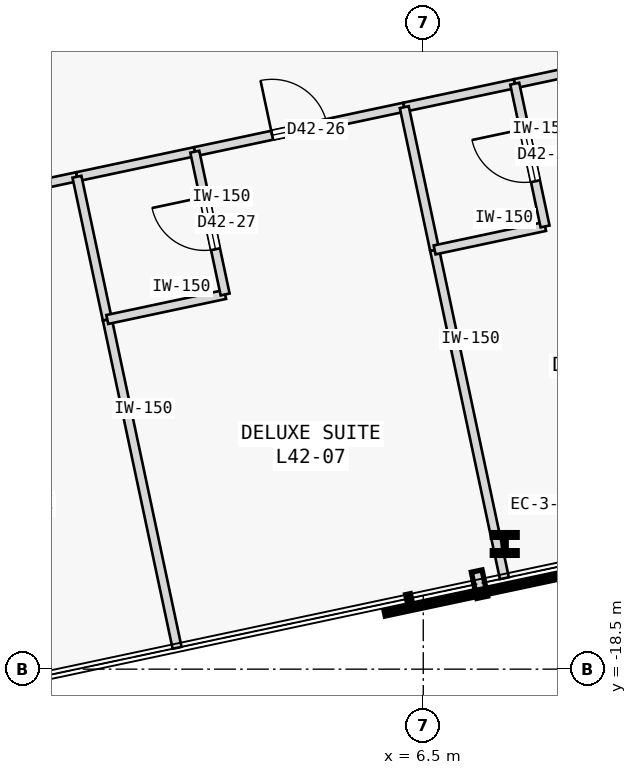
"""IFC4 building model, lengths in metres.
Left out: names, types, materials, properties, quantities, classifications, styles, units other than length and angle.
Written with IfcOpenShell. Run it as: python <this file> out.ifc"""

import sys

from ifc_helpers import new_model, si_unit, direction, frame, frame_2d, origin, origin_2d, place, context, subcontext, project, spatial, rectangle, i_section, extrude, element, fill, save


model = new_model("IFC4")
c1 = context("Model", 3, precision=1e-05, world=origin(), true_north=direction((0.0, 1.0)))
c2 = subcontext(c1, "Body", "Model", "MODEL_VIEW")
j1 = project(units=[si_unit("LENGTHUNIT", "METRE"), si_unit("PLANEANGLEUNIT", "RADIAN")], contexts=[c1])
p1 = place(None, origin())
s1 = spatial("IfcSite", under=j1, at=p1, CompositionType="ELEMENT")
p2 = place(p1, origin())
s2 = spatial("IfcBuilding", under=s1, at=p2, CompositionType="ELEMENT")
p3 = place(p2, frame((0.0, 0.0, 165.0)))
s3 = spatial("IfcBuildingStorey", under=s2, at=p3, CompositionType="ELEMENT", Elevation=165.0)
p4 = place(p3, frame((7.84, -16.441, 0.0), z_axis=(0.0, 0.0, 1.0), x_axis=(1.0, 0.0, 0.0)))
e1 = element("IfcColumn", 1, at=p4, inside=s3, PredefinedType="COLUMN", context=c2, shape_type="SweptSolid", body=[
    extrude(i_section(OverallWidth=0.409, OverallDepth=0.374, WebThickness=0.048, FlangeThickness=0.077, FilletRadius=0.015, at=origin_2d()), origin(), (0.0, 0.0, 1.0), 3.4),
])
p5 = place(p3, frame((-2.641, -11.135, 0.0), z_axis=(0.0, 0.0, 1.0), x_axis=(0.978150924733, 0.207896052016, 0.0)))
e2 = element("IfcWall", 2, at=p5, inside=s3, PredefinedType="PARTITIONING", context=c2, shape_type="SweptSolid", body=[
    extrude(rectangle(XDim=3.523, YDim=0.15, at=frame_2d((1.761, 0.0))), origin(), (0.0, 0.0, 1.0), 3.175),
])
p6 = place(p5, frame((1.302, 0.0, 0.0)))
e3 = element("IfcOpeningElement", 3, at=p6, cuts=e2, PredefinedType="OPENING", context=c2, shape_type="SweptSolid", body=[
    extrude(rectangle(XDim=0.92, YDim=2.15, at=frame_2d((0.46, 1.075))), frame((0.0, 0.085, 0.0), z_axis=(0.0, -1.0, 0.0), x_axis=(1.0, 0.0, 0.0)), (0.0, 0.0, 1.0), 0.17),
])
p7 = place(p3, frame((2.743, -9.99, 0.0), z_axis=(0.0, 0.0, 1.0), x_axis=(0.978153036861, 0.207886114205, 0.0)))
e4 = element("IfcWall", 4, at=p7, inside=s3, PredefinedType="PARTITIONING", context=c2, shape_type="SweptSolid", body=[
    extrude(rectangle(XDim=3.522, YDim=0.15, at=frame_2d((1.761, 0.0))), origin(), (0.0, 0.0, 1.0), 3.175),
])
p8 = place(p7, frame((1.301, 0.0, 0.0)))
e5 = element("IfcOpeningElement", 5, at=p8, cuts=e4, PredefinedType="OPENING", context=c2, shape_type="SweptSolid", body=[
    extrude(rectangle(XDim=0.92, YDim=2.15, at=frame_2d((0.46, 1.075))), frame((0.0, 0.085, 0.0), z_axis=(0.0, -1.0, 0.0), x_axis=(1.0, 0.0, 0.0)), (0.0, 0.0, 1.0), 0.17),
])
p9 = place(p3, frame((0.805, -10.402, 0.0), z_axis=(0.0, 0.0, 1.0), x_axis=(0.978149140323, 0.20790444749, 0.0)))
e6 = element("IfcWall", 6, at=p9, inside=s3, PredefinedType="PARTITIONING", context=c2, shape_type="SweptSolid", body=[
    extrude(rectangle(XDim=1.981, YDim=0.15, at=frame_2d((0.99, 0.0))), origin(), (0.0, 0.0, 1.0), 3.175),
])
p10 = place(p3, frame((8.004, -8.872, 0.0), z_axis=(0.0, 0.0, 1.0), x_axis=(0.97814625873, 0.20791800435, 0.0)))
e7 = element("IfcWall", 7, at=p10, inside=s3, PredefinedType="PARTITIONING", context=c2, shape_type="SweptSolid", body=[
    extrude(rectangle(XDim=3.302, YDim=0.15, at=frame_2d((1.651, 0.0))), origin(), (0.0, 0.0, 1.0), 3.175),
])
p11 = place(p10, frame((1.191, 0.0, 0.0)))
e8 = element("IfcOpeningElement", 8, at=p11, cuts=e7, PredefinedType="OPENING", context=c2, shape_type="SweptSolid", body=[
    extrude(rectangle(XDim=0.92, YDim=2.15, at=frame_2d((0.46, 1.075))), frame((0.0, 0.085, 0.0), z_axis=(0.0, -1.0, 0.0), x_axis=(1.0, 0.0, 0.0)), (0.0, 0.0, 1.0), 0.17),
])
p12 = place(p3, frame((6.188, -9.258, 0.0), z_axis=(0.0, 0.0, 1.0), x_axis=(0.978132112624, 0.207984543303, 0.0)))
e9 = element("IfcWall", 9, at=p12, inside=s3, PredefinedType="PARTITIONING", context=c2, shape_type="SweptSolid", body=[
    extrude(rectangle(XDim=1.857, YDim=0.15, at=frame_2d((0.928, 0.0))), origin(), (0.0, 0.0, 1.0), 3.175),
])
p13 = place(p3, frame((2.452, -18.149, 0.0), z_axis=(0.0, 0.0, 1.0), x_axis=(-0.20791588359, 0.978146709523, 0.0)))
e10 = element("IfcWall", 10, at=p13, inside=s3, PredefinedType="PARTITIONING", context=c2, shape_type="SweptSolid", body=[
    extrude(rectangle(XDim=5.52, YDim=0.15, at=frame_2d((2.76, 0.0))), origin(), (0.0, 0.0, 1.0), 3.175),
])
p14 = place(p3, frame((1.304, -12.75, 0.0), z_axis=(0.0, 0.0, 1.0), x_axis=(-0.207917150959, 0.978146440129, 0.0)))
e11 = element("IfcWall", 11, at=p14, inside=s3, PredefinedType="PARTITIONING", context=c2, shape_type="SweptSolid", body=[
    extrude(rectangle(XDim=2.4, YDim=0.15, at=frame_2d((1.2, 0.0))), origin(), (0.0, 0.0, 1.0), 3.175),
])
p15 = place(p3, frame((1.304, -12.75, 0.0), z_axis=(0.0, 0.0, 1.0), x_axis=(0.978149140323, 0.20790444749, 0.0)))
e12 = element("IfcWall", 12, at=p15, inside=s3, PredefinedType="PARTITIONING", context=c2, shape_type="SweptSolid", body=[
    extrude(rectangle(XDim=1.981, YDim=0.15, at=frame_2d((0.99, 0.0))), origin(), (0.0, 0.0, 1.0), 3.175),
])
p16 = place(p3, frame((3.242, -12.338, 0.0), z_axis=(0.0, 0.0, 1.0), x_axis=(-0.207917150959, 0.978146440129, 0.0)))
e13 = element("IfcWall", 13, at=p16, inside=s3, PredefinedType="PARTITIONING", context=c2, shape_type="SweptSolid", body=[
    extrude(rectangle(XDim=2.4, YDim=0.15, at=frame_2d((1.2, 0.0))), origin(), (0.0, 0.0, 1.0), 3.175),
])
p17 = place(p16, frame((0.76, 0.0, 0.0)))
e14 = element("IfcOpeningElement", 14, at=p17, cuts=e13, PredefinedType="OPENING", context=c2, shape_type="SweptSolid", body=[
    extrude(rectangle(XDim=0.88, YDim=2.15, at=frame_2d((0.44, 1.075))), frame((0.0, 0.085, 0.0), z_axis=(0.0, -1.0, 0.0), x_axis=(1.0, 0.0, 0.0)), (0.0, 0.0, 1.0), 0.17),
])
p18 = place(p3, frame((7.834, -17.005, 0.0), z_axis=(0.0, 0.0, 1.0), x_axis=(-0.207882560392, 0.978153792144, 0.0)))
e15 = element("IfcWall", 15, at=p18, inside=s3, PredefinedType="PARTITIONING", context=c2, shape_type="SweptSolid", body=[
    extrude(rectangle(XDim=5.52, YDim=0.15, at=frame_2d((2.76, 0.0))), origin(), (0.0, 0.0, 1.0), 3.175),
])
p19 = place(p3, frame((6.687, -11.606, 0.0), z_axis=(0.0, 0.0, 1.0), x_axis=(-0.207917150959, 0.978146440129, 0.0)))
e16 = element("IfcWall", 16, at=p19, inside=s3, PredefinedType="PARTITIONING", context=c2, shape_type="SweptSolid", body=[
    extrude(rectangle(XDim=2.4, YDim=0.15, at=frame_2d((1.2, 0.0))), origin(), (0.0, 0.0, 1.0), 3.175),
])
p20 = place(p3, frame((6.687, -11.606, 0.0), z_axis=(0.0, 0.0, 1.0), x_axis=(0.978132112624, 0.207984543303, 0.0)))
e17 = element("IfcWall", 17, at=p20, inside=s3, PredefinedType="PARTITIONING", context=c2, shape_type="SweptSolid", body=[
    extrude(rectangle(XDim=1.857, YDim=0.15, at=frame_2d((0.928, 0.0))), origin(), (0.0, 0.0, 1.0), 3.175),
])
p21 = place(p3, frame((8.503, -11.219, 0.0), z_axis=(0.0, 0.0, 1.0), x_axis=(-0.207917150959, 0.978146440129, 0.0)))
e18 = element("IfcWall", 18, at=p21, inside=s3, PredefinedType="PARTITIONING", context=c2, shape_type="SweptSolid", body=[
    extrude(rectangle(XDim=2.4, YDim=0.15, at=frame_2d((1.2, 0.0))), origin(), (0.0, 0.0, 1.0), 3.175),
])
p22 = place(p21, frame((0.76, 0.0, 0.0)))
e19 = element("IfcOpeningElement", 19, at=p22, cuts=e18, PredefinedType="OPENING", context=c2, shape_type="SweptSolid", body=[
    extrude(rectangle(XDim=0.88, YDim=2.15, at=frame_2d((0.44, 1.075))), frame((0.0, 0.085, 0.0), z_axis=(0.0, -1.0, 0.0), x_axis=(1.0, 0.0, 0.0)), (0.0, 0.0, 1.0), 0.17),
])
p23 = place(p8, origin())
e20 = element("IfcDoor", 20, at=p23, inside=s3, OperationType="SINGLE_SWING_LEFT", PredefinedType="DOOR", context=c2, shape_type="SweptSolid", body=[
    extrude(rectangle(XDim=0.92, YDim=2.15, at=frame_2d((0.46, 1.075))), frame((0.0, 0.025, 0.0), z_axis=(0.0, -1.0, 0.0), x_axis=(1.0, 0.0, 0.0)), (0.0, 0.0, 1.0), 0.05),
])
fill(e5, e20)
p24 = place(p17, origin())
e21 = element("IfcDoor", 21, at=p24, inside=s3, OperationType="SINGLE_SWING_RIGHT", PredefinedType="DOOR", context=c2, shape_type="SweptSolid", body=[
    extrude(rectangle(XDim=0.88, YDim=2.15, at=frame_2d((0.44, 1.075))), frame((0.0, 0.025, 0.0), z_axis=(0.0, -1.0, 0.0), x_axis=(1.0, 0.0, 0.0)), (0.0, 0.0, 1.0), 0.05),
])
fill(e14, e21)
p25 = place(p22, origin())
e22 = element("IfcDoor", 22, at=p25, inside=s3, OperationType="SINGLE_SWING_RIGHT", PredefinedType="DOOR", context=c2, shape_type="SweptSolid", body=[
    extrude(rectangle(XDim=0.88, YDim=2.15, at=frame_2d((0.44, 1.075))), frame((0.0, 0.025, 0.0), z_axis=(0.0, -1.0, 0.0), x_axis=(1.0, 0.0, 0.0)), (0.0, 0.0, 1.0), 0.05),
])
fill(e19, e22)
save(model, sys.argv[1])
